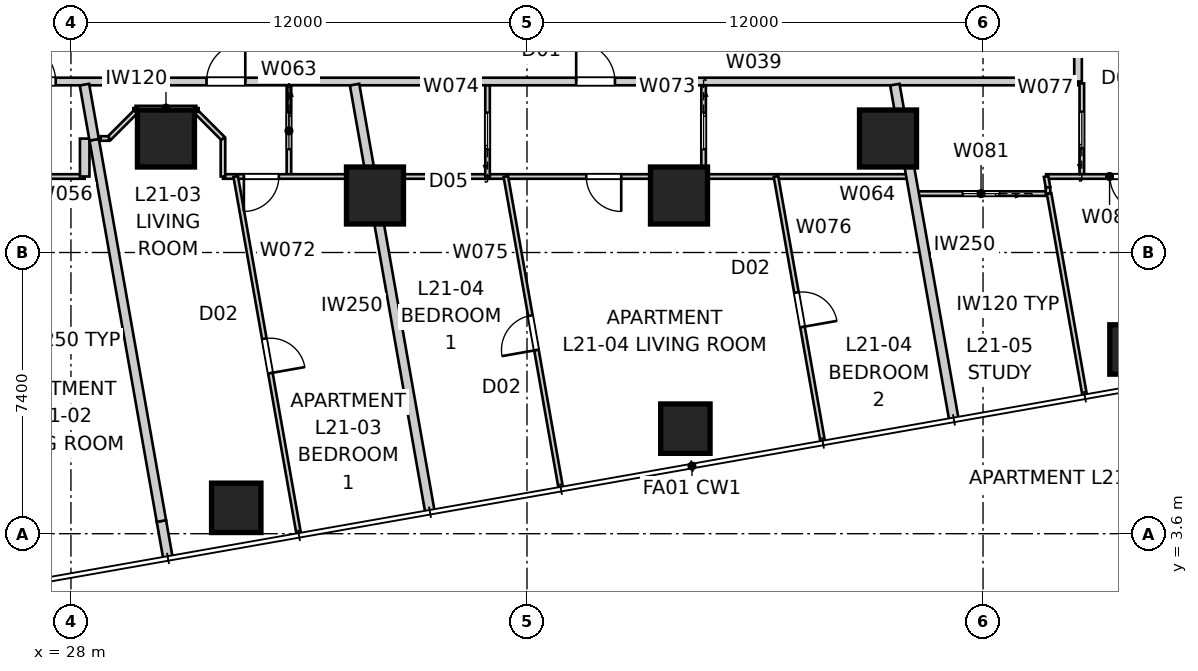
"""IFC4 building model, lengths in metres.
Left out: names, types, materials, properties, quantities, classifications, styles, units other than length and angle.
Written with IfcOpenShell. Run it as: python <this file> out.ifc"""

import sys

from ifc_helpers import new_model, si_unit, direction, frame, frame_2d, origin, origin_2d, place, context, subcontext, project, spatial, rectangle, extrude, element, fill, save


model = new_model("IFC4")
c1 = context("Model", 3, precision=1e-05, world=origin(), true_north=direction((0.0, 1.0)))
c2 = subcontext(c1, "Body", "Model", "MODEL_VIEW")
j1 = project(units=[si_unit("LENGTHUNIT", "METRE"), si_unit("PLANEANGLEUNIT", "RADIAN")], contexts=[c1])
p1 = place(None, origin())
s1 = spatial("IfcSite", under=j1, at=p1, CompositionType="ELEMENT")
p2 = place(p1, origin())
s2 = spatial("IfcBuilding", under=s1, at=p2, CompositionType="ELEMENT")
p3 = place(p2, frame((0.0, 0.0, 79.4)))
s3 = spatial("IfcBuildingStorey", under=s2, at=p3, CompositionType="ELEMENT", Elevation=79.4)
for number, where, z_axis, x_axis in (
    (1, (32.35, 4.281, -0.15), (0.0, 0.0, 1.0), (1.0, 0.0, 0.0)),
    (2, (44.167, 6.365, -0.15), (0.0, 0.0, 1.0), (1.0, 0.0, 0.0)),
    (3, (55.985, 8.448, -0.15), (0.0, 0.0, 1.0), (1.0, 0.0, 0.0)),
):
    element("IfcColumn", number, at=place(p3, frame(where, z_axis=z_axis, x_axis=x_axis)), inside=s3, PredefinedType="COLUMN", context=c2, shape_type="SweptSolid", body=[
        extrude(rectangle(XDim=1.3, YDim=1.3, at=origin_2d()), origin(), (0.0, 0.0, 1.0), 3.55),
    ])
for number, where, z_axis, x_axis in (
    (4, (30.5, 14.0, 0.0), (0.0, 0.0, 1.0), (1.0, 0.0, 0.0)),
    (5, (36.0, 12.5, 0.0), (0.0, 0.0, 1.0), (1.0, 0.0, 0.0)),
    (6, (44.0, 12.5, 0.0), (0.0, 0.0, 1.0), (1.0, 0.0, 0.0)),
    (7, (49.5, 14.0, 0.0), (0.0, 0.0, 1.0), (1.0, 0.0, 0.0)),
):
    element("IfcColumn", number, at=place(p3, frame(where, z_axis=z_axis, x_axis=x_axis)), inside=s3, PredefinedType="COLUMN", context=c2, shape_type="SweptSolid", body=[
        extrude(rectangle(XDim=1.5, YDim=1.5, at=origin_2d()), origin(), (0.0, 0.0, 1.0), 3.4),
    ])
p4 = place(p3, frame((25.5, 15.5, 0.0), z_axis=(0.0, 0.0, 1.0), x_axis=(1.0, 0.0, 0.0)))
e8 = element("IfcWall", 8, at=p4, inside=s3, PredefinedType="PARTITIONING", context=c2, shape_type="SweptSolid", body=[
    extrude(rectangle(XDim=29.0, YDim=0.2, at=frame_2d((14.5, 0.0))), origin(), (0.0, 0.0, 1.0), 3.25),
])
p5 = place(p4, frame((15.794, 0.0, 0.0)))
e9 = element("IfcOpeningElement", 9, at=p5, cuts=e8, PredefinedType="OPENING", context=c2, shape_type="SweptSolid", body=[
    extrude(rectangle(XDim=1.02, YDim=2.34, at=frame_2d((0.51, 1.17))), frame((0.0, 0.11, 0.0), z_axis=(0.0, -1.0, 0.0), x_axis=(1.0, 0.0, 0.0)), (0.0, 0.0, 1.0), 0.22),
])
p6 = place(p4, frame((6.067, 0.0, 0.0)))
e10 = element("IfcOpeningElement", 10, at=p6, cuts=e8, PredefinedType="OPENING", context=c2, shape_type="SweptSolid", body=[
    extrude(rectangle(XDim=1.02, YDim=2.34, at=frame_2d((0.51, 1.17))), frame((0.0, 0.11, 0.0), z_axis=(0.0, -1.0, 0.0), x_axis=(1.0, 0.0, 0.0)), (0.0, 0.0, 1.0), 0.22),
])
p7 = place(p4, frame((1.079, 0.0, 0.0)))
e11 = element("IfcOpeningElement", 11, at=p7, cuts=e8, PredefinedType="OPENING", context=c2, shape_type="SweptSolid", body=[
    extrude(rectangle(XDim=1.02, YDim=2.34, at=frame_2d((0.51, 1.17))), frame((0.0, 0.11, 0.0), z_axis=(0.0, -1.0, 0.0), x_axis=(1.0, 0.0, 0.0)), (0.0, 0.0, 1.0), 0.22),
])
p8 = place(p3, frame((54.5, 15.5, 0.0), z_axis=(0.0, 0.0, 1.0), x_axis=(0.0, 1.0, 0.0)))
e12 = element("IfcWall", 12, at=p8, inside=s3, PredefinedType="PARTITIONING", context=c2, shape_type="SweptSolid", body=[
    extrude(rectangle(XDim=29.0, YDim=0.2, at=frame_2d((14.5, 0.0))), origin(), (0.0, 0.0, 1.0), 3.25),
])
p9 = place(p8, frame((21.815, 0.0, 0.0)))
e13 = element("IfcOpeningElement", 13, at=p9, cuts=e12, PredefinedType="OPENING", context=c2, shape_type="SweptSolid", body=[
    extrude(rectangle(XDim=1.02, YDim=2.34, at=frame_2d((0.51, 1.17))), frame((0.0, 0.11, 0.0), z_axis=(0.0, -1.0, 0.0), x_axis=(1.0, 0.0, 0.0)), (0.0, 0.0, 1.0), 0.22),
])
p10 = place(p8, frame((2.855, 0.0, 0.0)))
e14 = element("IfcOpeningElement", 14, at=p10, cuts=e12, PredefinedType="OPENING", context=c2, shape_type="SweptSolid", body=[
    extrude(rectangle(XDim=1.02, YDim=2.1, at=frame_2d((0.51, 1.05))), frame((0.0, 0.11, 0.0), z_axis=(0.0, -1.0, 0.0), x_axis=(1.0, 0.0, 0.0)), (0.0, 0.0, 1.0), 0.22),
])
p11 = place(p3, frame((37.448, 4.164, 0.0), z_axis=(0.0, 0.0, 1.0), x_axis=(-0.173635416642, 0.98481000304, 0.0)))
e15 = element("IfcWall", 15, at=p11, inside=s3, PredefinedType="PARTITIONING", context=c2, shape_type="SweptSolid", body=[
    extrude(rectangle(XDim=11.427, YDim=0.25, at=frame_2d((5.713, 0.0))), origin(), (0.0, 0.0, 1.0), 3.25),
])
p12 = place(p3, frame((51.235, 6.595, 0.0), z_axis=(0.0, 0.0, 1.0), x_axis=(-0.173654738504, 0.984806596137, 0.0)))
e16 = element("IfcWall", 16, at=p12, inside=s3, PredefinedType="PARTITIONING", context=c2, shape_type="SweptSolid", body=[
    extrude(rectangle(XDim=8.958, YDim=0.25, at=frame_2d((4.479, 0.0))), origin(), (0.0, 0.0, 1.0), 3.25),
])
p13 = place(p3, frame((30.554, 2.949, 0.0), z_axis=(0.0, 0.0, 1.0), x_axis=(-0.173813186416, 0.984778643263, 0.0)))
e17 = element("IfcWall", 17, at=p13, inside=s3, PredefinedType="PARTITIONING", context=c2, shape_type="SweptSolid", body=[
    extrude(rectangle(XDim=1.0, YDim=0.25, at=frame_2d((0.5, 0.0))), origin(), (0.0, 0.0, 1.0), 3.25),
])
p14 = place(p3, frame((30.38, 3.934, 0.0), z_axis=(0.0, 0.0, 1.0), x_axis=(-0.173644522411, 0.984808397525, 0.0)))
e18 = element("IfcWall", 18, at=p14, inside=s3, PredefinedType="PARTITIONING", context=c2, shape_type="SweptSolid", body=[
    extrude(rectangle(XDim=10.188, YDim=0.25, at=frame_2d((5.094, 0.0))), origin(), (0.0, 0.0, 1.0), 2.638),
])
p15 = place(p3, frame((28.611, 13.967, 0.0), z_axis=(0.0, 0.0, 1.0), x_axis=(-0.173634105885, 0.984810234143, 0.0)))
e19 = element("IfcWall", 19, at=p15, inside=s3, PredefinedType="PARTITIONING", context=c2, shape_type="SweptSolid", body=[
    extrude(rectangle(XDim=1.474, YDim=0.25, at=frame_2d((0.737, 0.0))), origin(), (0.0, 0.0, 1.0), 3.25),
])
p16 = place(p3, frame((28.362, 13.0, 0.0), z_axis=(0.0, 0.0, 1.0), x_axis=(-1.0, 0.0, 0.0)))
e20 = element("IfcWall", 20, at=p16, inside=s3, PredefinedType="PARTITIONING", context=c2, shape_type="SweptSolid", body=[
    extrude(rectangle(XDim=4.151, YDim=0.12, at=frame_2d((2.076, 0.0))), origin(), (0.0, 0.0, 1.0), 2.638),
])
p17 = place(p16, frame((1.76, 0.0, 0.0)))
e21 = element("IfcOpeningElement", 21, at=p17, cuts=e20, PredefinedType="OPENING", context=c2, shape_type="SweptSolid", body=[
    extrude(rectangle(XDim=0.92, YDim=2.34, at=frame_2d((0.46, 1.17))), frame((0.0, 0.07, 0.0), z_axis=(0.0, -1.0, 0.0), x_axis=(1.0, 0.0, 0.0)), (0.0, 0.0, 1.0), 0.14),
])
p18 = place(p3, frame((28.362, 13.998, 0.0), z_axis=(0.0, 0.0, 1.0), x_axis=(0.0, -1.0, 0.0)))
e22 = element("IfcWall", 22, at=p18, inside=s3, PredefinedType="PARTITIONING", context=c2, shape_type="SweptSolid", body=[
    extrude(rectangle(XDim=0.998, YDim=0.25, at=frame_2d((0.499, 0.0))), origin(), (0.0, 0.0, 1.0), 3.25),
])
p19 = place(p3, frame((33.736, 15.4, 0.0), z_axis=(0.0, 0.0, 1.0), x_axis=(0.0, -1.0, 0.0)))
e23 = element("IfcWall", 23, at=p19, inside=s3, PredefinedType="PARTITIONING", context=c2, shape_type="SweptSolid", body=[
    extrude(rectangle(XDim=2.4, YDim=0.12, at=frame_2d((1.2, 0.0))), origin(), (0.0, 0.0, 1.0), 3.25),
])
p20 = place(p19, frame((0.72, 0.0, 0.0)))
e24 = element("IfcOpeningElement", 24, at=p20, cuts=e23, PredefinedType="OPENING", context=c2, shape_type="SweptSolid", body=[
    extrude(rectangle(XDim=0.96, YDim=2.1, at=frame_2d((0.48, 1.05))), frame((0.0, 0.07, 0.0), z_axis=(0.0, -1.0, 0.0), x_axis=(1.0, 0.0, 0.0)), (0.0, 0.0, 1.0), 0.14),
])
p21 = place(p3, frame((50.105, 13.0, 0.0), z_axis=(0.0, 0.0, 1.0), x_axis=(-1.0, 0.0, 0.0)))
e25 = element("IfcWall", 25, at=p21, inside=s3, PredefinedType="PARTITIONING", context=c2, shape_type="SweptSolid", body=[
    extrude(rectangle(XDim=18.105, YDim=0.12, at=frame_2d((9.053, 0.0))), origin(), (0.0, 0.0, 1.0), 2.55),
])
p22 = place(p21, frame((7.626, 0.0, 0.0)))
e26 = element("IfcOpeningElement", 26, at=p22, cuts=e25, PredefinedType="OPENING", context=c2, shape_type="SweptSolid", body=[
    extrude(rectangle(XDim=0.92, YDim=2.34, at=frame_2d((0.46, 1.17))), frame((0.0, 0.07, 0.0), z_axis=(0.0, -1.0, 0.0), x_axis=(1.0, 0.0, 0.0)), (0.0, 0.0, 1.0), 0.14),
])
p23 = place(p21, frame((16.635, 0.0, 0.0)))
e27 = element("IfcOpeningElement", 27, at=p23, cuts=e25, PredefinedType="OPENING", context=c2, shape_type="SweptSolid", body=[
    extrude(rectangle(XDim=0.92, YDim=2.34, at=frame_2d((0.46, 1.17))), frame((0.0, 0.07, 0.0), z_axis=(0.0, -1.0, 0.0), x_axis=(1.0, 0.0, 0.0)), (0.0, 0.0, 1.0), 0.14),
])
p24 = place(p3, frame((32.0, 13.0, 0.0), z_axis=(0.0, 0.0, 1.0), x_axis=(0.0, 1.0, 0.0)))
e28 = element("IfcWall", 28, at=p24, inside=s3, PredefinedType="PARTITIONING", context=c2, shape_type="SweptSolid", body=[
    extrude(rectangle(XDim=1.0, YDim=0.12, at=frame_2d((0.5, 0.0))), origin(), (0.0, 0.0, 1.0), 3.25),
])
p25 = place(p3, frame((32.0, 14.0, 0.0), z_axis=(0.0, 0.0, 1.0), x_axis=(-0.707106781187, 0.707106781187, 0.0)))
e29 = element("IfcWall", 29, at=p25, inside=s3, PredefinedType="PARTITIONING", context=c2, shape_type="SweptSolid", body=[
    extrude(rectangle(XDim=0.99, YDim=0.12, at=frame_2d((0.495, 0.0))), origin(), (0.0, 0.0, 1.0), 3.25),
])
p26 = place(p3, frame((31.3, 14.8, 0.0), z_axis=(0.0, 0.0, 1.0), x_axis=(-1.0, 0.0, 0.0)))
e30 = element("IfcWall", 30, at=p26, inside=s3, PredefinedType="PARTITIONING", context=c2, shape_type="SweptSolid", body=[
    extrude(rectangle(XDim=1.6, YDim=0.12, at=frame_2d((0.8, 0.0))), origin(), (0.0, 0.0, 1.0), 3.25),
])
p27 = place(p3, frame((29.7, 14.7, 0.0), z_axis=(0.0, 0.0, 1.0), x_axis=(-0.707106781187, -0.707106781187, 0.0)))
e31 = element("IfcWall", 31, at=p27, inside=s3, PredefinedType="PARTITIONING", context=c2, shape_type="SweptSolid", body=[
    extrude(rectangle(XDim=0.99, YDim=0.12, at=frame_2d((0.495, 0.0))), origin(), (0.0, 0.0, 1.0), 3.25),
])
p28 = place(p3, frame((29.0, 14.0, 0.0), z_axis=(0.0, 0.0, 1.0), x_axis=(-1.0, 0.0, 0.0)))
e32 = element("IfcWall", 32, at=p28, inside=s3, PredefinedType="PARTITIONING", context=c2, shape_type="SweptSolid", body=[
    extrude(rectangle(XDim=0.219, YDim=0.12, at=frame_2d((0.109, 0.0))), origin(), (0.0, 0.0, 1.0), 3.25),
])
p29 = place(p3, frame((32.336, 13.0, 0.0), z_axis=(0.0, 0.0, 1.0), x_axis=(0.173624894944, -0.984811858101, 0.0)))
e33 = element("IfcWall", 33, at=p29, inside=s3, PredefinedType="PARTITIONING", context=c2, shape_type="SweptSolid", body=[
    extrude(rectangle(XDim=9.549, YDim=0.12, at=frame_2d((4.774, 0.0))), origin(), (0.0, 0.0, 1.0), 3.25),
])
p30 = place(p29, frame((4.334, 0.0, 0.0)))
e34 = element("IfcOpeningElement", 34, at=p30, cuts=e33, PredefinedType="OPENING", context=c2, shape_type="SweptSolid", body=[
    extrude(rectangle(XDim=0.92, YDim=2.34, at=frame_2d((0.46, 1.17))), frame((0.0, 0.07, 0.0), z_axis=(0.0, -1.0, 0.0), x_axis=(1.0, 0.0, 0.0)), (0.0, 0.0, 1.0), 0.14),
])
p31 = place(p3, frame((44.647, 15.4, 0.0), z_axis=(0.0, 0.0, 1.0), x_axis=(0.0, -1.0, 0.0)))
e35 = element("IfcWall", 35, at=p31, inside=s3, PredefinedType="PARTITIONING", context=c2, shape_type="SweptSolid", body=[
    extrude(rectangle(XDim=2.4, YDim=0.12, at=frame_2d((1.2, 0.0))), origin(), (0.0, 0.0, 1.0), 3.25),
])
p32 = place(p31, frame((0.72, 0.0, 0.0)))
e36 = element("IfcOpeningElement", 36, at=p32, cuts=e35, PredefinedType="OPENING", context=c2, shape_type="SweptSolid", body=[
    extrude(rectangle(XDim=0.96, YDim=2.1, at=frame_2d((0.48, 1.05))), frame((0.0, 0.07, 0.0), z_axis=(0.0, -1.0, 0.0), x_axis=(1.0, 0.0, 0.0)), (0.0, 0.0, 1.0), 0.14),
])
p33 = place(p3, frame((38.962, 13.0, 0.0), z_axis=(0.0, 0.0, 1.0), x_axis=(0.0, 1.0, 0.0)))
e37 = element("IfcWall", 37, at=p33, inside=s3, PredefinedType="PARTITIONING", context=c2, shape_type="SweptSolid", body=[
    extrude(rectangle(XDim=2.4, YDim=0.12, at=frame_2d((1.2, 0.0))), origin(), (0.0, 0.0, 1.0), 3.25),
])
p34 = place(p33, frame((0.72, 0.0, 0.0)))
e38 = element("IfcOpeningElement", 38, at=p34, cuts=e37, PredefinedType="OPENING", context=c2, shape_type="SweptSolid", body=[
    extrude(rectangle(XDim=0.96, YDim=2.1, at=frame_2d((0.48, 1.05))), frame((0.0, 0.07, 0.0), z_axis=(0.0, -1.0, 0.0), x_axis=(1.0, 0.0, 0.0)), (0.0, 0.0, 1.0), 0.14),
])
p35 = place(p3, frame((40.887, 4.812, 0.0), z_axis=(0.0, 0.0, 1.0), x_axis=(-0.173647980238, 0.984807787824, 0.0)))
e39 = element("IfcWall", 39, at=p35, inside=s3, PredefinedType="PARTITIONING", context=c2, shape_type="SweptSolid", body=[
    extrude(rectangle(XDim=8.315, YDim=0.12, at=frame_2d((4.157, 0.0))), origin(), (0.0, 0.0, 1.0), 3.25),
])
p36 = place(p35, frame((3.677, 0.0, 0.0)))
e40 = element("IfcOpeningElement", 40, at=p36, cuts=e39, PredefinedType="OPENING", context=c2, shape_type="SweptSolid", body=[
    extrude(rectangle(XDim=0.92, YDim=2.34, at=frame_2d((0.46, 1.17))), frame((0.0, 0.07, 0.0), z_axis=(0.0, -1.0, 0.0), x_axis=(1.0, 0.0, 0.0)), (0.0, 0.0, 1.0), 0.14),
])
p37 = place(p3, frame((46.552, 13.0, 0.0), z_axis=(0.0, 0.0, 1.0), x_axis=(0.173639776761, -0.984809234282, 0.0)))
e41 = element("IfcWall", 41, at=p37, inside=s3, PredefinedType="PARTITIONING", context=c2, shape_type="SweptSolid", body=[
    extrude(rectangle(XDim=7.081, YDim=0.12, at=frame_2d((3.541, 0.0))), origin(), (0.0, 0.0, 1.0), 3.25),
])
p38 = place(p37, frame((3.1, 0.0, 0.0)))
e42 = element("IfcOpeningElement", 42, at=p38, cuts=e41, PredefinedType="OPENING", context=c2, shape_type="SweptSolid", body=[
    extrude(rectangle(XDim=0.92, YDim=2.34, at=frame_2d((0.46, 1.17))), frame((0.0, 0.07, 0.0), z_axis=(0.0, -1.0, 0.0), x_axis=(1.0, 0.0, 0.0)), (0.0, 0.0, 1.0), 0.14),
])
p39 = place(p3, frame((54.6, 13.0, 0.0), z_axis=(0.0, 0.0, 1.0), x_axis=(0.0, 1.0, 0.0)))
e43 = element("IfcWall", 43, at=p39, inside=s3, PredefinedType="PARTITIONING", context=c2, shape_type="SweptSolid", body=[
    extrude(rectangle(XDim=2.45, YDim=0.12, at=frame_2d((1.225, 0.0))), origin(), (0.0, 0.0, 1.0), 3.25),
])
p40 = place(p39, frame((0.745, 0.0, 0.0)))
e44 = element("IfcOpeningElement", 44, at=p40, cuts=e43, PredefinedType="OPENING", context=c2, shape_type="SweptSolid", body=[
    extrude(rectangle(XDim=0.96, YDim=2.1, at=frame_2d((0.48, 1.05))), frame((0.0, 0.07, 0.0), z_axis=(0.0, -1.0, 0.0), x_axis=(1.0, 0.0, 0.0)), (0.0, 0.0, 1.0), 0.14),
])
p41 = place(p3, frame((57.0, 13.0, 0.0), z_axis=(0.0, 0.0, 1.0), x_axis=(-1.0, 0.0, 0.0)))
e45 = element("IfcWall", 45, at=p41, inside=s3, PredefinedType="PARTITIONING", context=c2, shape_type="SweptSolid", body=[
    extrude(rectangle(XDim=3.34, YDim=0.12, at=frame_2d((1.67, 0.0))), origin(), (0.0, 0.0, 1.0), 3.25),
])
p42 = place(p41, frame((0.74, 0.0, 0.0)))
e46 = element("IfcOpeningElement", 46, at=p42, cuts=e45, PredefinedType="OPENING", context=c2, shape_type="SweptSolid", body=[
    extrude(rectangle(XDim=0.92, YDim=2.34, at=frame_2d((0.46, 1.17))), frame((0.0, 0.07, 0.0), z_axis=(0.0, -1.0, 0.0), x_axis=(1.0, 0.0, 0.0)), (0.0, 0.0, 1.0), 0.14),
])
p43 = place(p3, frame((53.71, 12.55, 0.0), z_axis=(0.0, 0.0, 1.0), x_axis=(-1.0, 0.0, 0.0)))
e47 = element("IfcWall", 47, at=p43, inside=s3, PredefinedType="PARTITIONING", context=c2, shape_type="SweptSolid", body=[
    extrude(rectangle(XDim=3.525, YDim=0.12, at=frame_2d((1.763, 0.0))), origin(), (0.0, 0.0, 1.0), 3.25),
])
p44 = place(p43, frame((1.283, 0.0, 0.0)))
e48 = element("IfcOpeningElement", 48, at=p44, cuts=e47, PredefinedType="OPENING", context=c2, shape_type="SweptSolid", body=[
    extrude(rectangle(XDim=0.96, YDim=2.1, at=frame_2d((0.48, 1.05))), frame((0.0, 0.07, 0.0), z_axis=(0.0, -1.0, 0.0), x_axis=(1.0, 0.0, 0.0)), (0.0, 0.0, 1.0), 0.14),
])
p45 = place(p3, frame((53.66, 13.0, 0.0), z_axis=(0.0, 0.0, 1.0), x_axis=(0.172927442902, -0.984934566096, 0.0)))
e49 = element("IfcWall", 49, at=p45, inside=s3, PredefinedType="PARTITIONING", context=c2, shape_type="SweptSolid", body=[
    extrude(rectangle(XDim=0.292, YDim=0.12, at=frame_2d((0.146, 0.0))), origin(), (0.0, 0.0, 1.0), 3.25),
])
p46 = place(p3, frame((53.739, 12.55, 0.0), z_axis=(0.0, 0.0, 1.0), x_axis=(0.173632864151, -0.984810453076, 0.0)))
e50 = element("IfcWall", 50, at=p46, inside=s3, PredefinedType="PARTITIONING", context=c2, shape_type="SweptSolid", body=[
    extrude(rectangle(XDim=5.389, YDim=0.12, at=frame_2d((2.695, 0.0))), origin(), (0.0, 0.0, 1.0), 3.25),
])
for number, where, z_axis, x_axis in (
    (51, (31.3, 14.8, 0.0), (0.0, 0.0, 1.0), (0.0, -1.0, 0.0)),
    (52, (29.7, 14.8, 0.0), (0.0, 0.0, 1.0), (0.0, -1.0, 0.0)),
):
    element("IfcWall", number, at=place(p3, frame(where, z_axis=z_axis, x_axis=x_axis)), inside=s3, PredefinedType="PARTITIONING", context=c2, shape_type="SweptSolid", body=[
        extrude(rectangle(XDim=0.1, YDim=0.12, at=frame_2d((0.05, 0.0))), origin(), (0.0, 0.0, 1.0), 3.25),
    ])
p47 = place(p3, frame((53.71, 12.712, 0.0), z_axis=(0.0, 0.0, 1.0), x_axis=(0.0, -1.0, 0.0)))
e53 = element("IfcWall", 53, at=p47, inside=s3, PredefinedType="PARTITIONING", context=c2, shape_type="SweptSolid", body=[
    extrude(rectangle(XDim=0.162, YDim=0.12, at=frame_2d((0.081, 0.0))), origin(), (0.0, 0.0, 1.0), 3.25),
])
p48 = place(p5, origin())
e54 = element("IfcDoor", 54, at=p48, inside=s3, OperationType="SINGLE_SWING_LEFT", PredefinedType="DOOR", context=c2, shape_type="SweptSolid", body=[
    extrude(rectangle(XDim=1.02, YDim=2.34, at=frame_2d((0.51, 1.17))), frame((0.0, 0.025, 0.0), z_axis=(0.0, -1.0, 0.0), x_axis=(1.0, 0.0, 0.0)), (0.0, 0.0, 1.0), 0.05),
])
fill(e9, e54)
p49 = place(p6, origin())
e55 = element("IfcDoor", 55, at=p49, inside=s3, OperationType="SINGLE_SWING_RIGHT", PredefinedType="DOOR", context=c2, shape_type="SweptSolid", body=[
    extrude(rectangle(XDim=1.02, YDim=2.34, at=frame_2d((0.51, 1.17))), frame((0.0, 0.025, 0.0), z_axis=(0.0, -1.0, 0.0), x_axis=(1.0, 0.0, 0.0)), (0.0, 0.0, 1.0), 0.05),
])
fill(e10, e55)
p50 = place(p7, origin())
e56 = element("IfcDoor", 56, at=p50, inside=s3, OperationType="SINGLE_SWING_LEFT", PredefinedType="DOOR", context=c2, shape_type="SweptSolid", body=[
    extrude(rectangle(XDim=1.02, YDim=2.34, at=frame_2d((0.51, 1.17))), frame((0.0, 0.025, 0.0), z_axis=(0.0, -1.0, 0.0), x_axis=(1.0, 0.0, 0.0)), (0.0, 0.0, 1.0), 0.05),
])
fill(e11, e56)
p51 = place(p40, origin())
e57 = element("IfcDoor", 57, at=p51, inside=s3, OperationType="SLIDING_TO_LEFT", PredefinedType="DOOR", context=c2, shape_type="SweptSolid", body=[
    extrude(rectangle(XDim=0.96, YDim=2.1, at=frame_2d((0.48, 1.05))), frame((0.0, 0.025, 0.0), z_axis=(0.0, -1.0, 0.0), x_axis=(1.0, 0.0, 0.0)), (0.0, 0.0, 1.0), 0.05),
])
fill(e44, e57)
p52 = place(p42, origin())
e58 = element("IfcDoor", 58, at=p52, inside=s3, OperationType="SINGLE_SWING_LEFT", PredefinedType="DOOR", context=c2, shape_type="SweptSolid", body=[
    extrude(rectangle(XDim=0.92, YDim=2.34, at=frame_2d((0.46, 1.17))), frame((0.0, 0.025, 0.0), z_axis=(0.0, -1.0, 0.0), x_axis=(1.0, 0.0, 0.0)), (0.0, 0.0, 1.0), 0.05),
])
fill(e46, e58)
p53 = place(p22, origin())
e59 = element("IfcDoor", 59, at=p53, inside=s3, OperationType="SINGLE_SWING_LEFT", PredefinedType="DOOR", context=c2, shape_type="SweptSolid", body=[
    extrude(rectangle(XDim=0.92, YDim=2.34, at=frame_2d((0.46, 1.17))), frame((0.0, 0.025, 0.0), z_axis=(0.0, -1.0, 0.0), x_axis=(1.0, 0.0, 0.0)), (0.0, 0.0, 1.0), 0.05),
])
fill(e26, e59)
p54 = place(p32, origin())
e60 = element("IfcDoor", 60, at=p54, inside=s3, OperationType="SLIDING_TO_LEFT", PredefinedType="DOOR", context=c2, shape_type="SweptSolid", body=[
    extrude(rectangle(XDim=0.96, YDim=2.1, at=frame_2d((0.48, 1.05))), frame((0.0, 0.025, 0.0), z_axis=(0.0, -1.0, 0.0), x_axis=(1.0, 0.0, 0.0)), (0.0, 0.0, 1.0), 0.05),
])
fill(e36, e60)
p55 = place(p34, origin())
e61 = element("IfcDoor", 61, at=p55, inside=s3, OperationType="SLIDING_TO_LEFT", PredefinedType="DOOR", context=c2, shape_type="SweptSolid", body=[
    extrude(rectangle(XDim=0.96, YDim=2.1, at=frame_2d((0.48, 1.05))), frame((0.0, 0.025, 0.0), z_axis=(0.0, -1.0, 0.0), x_axis=(1.0, 0.0, 0.0)), (0.0, 0.0, 1.0), 0.05),
])
fill(e38, e61)
p56 = place(p20, origin())
e62 = element("IfcDoor", 62, at=p56, inside=s3, OperationType="SLIDING_TO_LEFT", PredefinedType="DOOR", context=c2, shape_type="SweptSolid", body=[
    extrude(rectangle(XDim=0.96, YDim=2.1, at=frame_2d((0.48, 1.05))), frame((0.0, 0.025, 0.0), z_axis=(0.0, -1.0, 0.0), x_axis=(1.0, 0.0, 0.0)), (0.0, 0.0, 1.0), 0.05),
])
fill(e24, e62)
p57 = place(p23, origin())
e63 = element("IfcDoor", 63, at=p57, inside=s3, OperationType="SINGLE_SWING_RIGHT", PredefinedType="DOOR", context=c2, shape_type="SweptSolid", body=[
    extrude(rectangle(XDim=0.92, YDim=2.34, at=frame_2d((0.46, 1.17))), frame((0.0, 0.025, 0.0), z_axis=(0.0, -1.0, 0.0), x_axis=(1.0, 0.0, 0.0)), (0.0, 0.0, 1.0), 0.05),
])
fill(e27, e63)
p58 = place(p44, origin())
e64 = element("IfcDoor", 64, at=p58, inside=s3, OperationType="SLIDING_TO_LEFT", PredefinedType="DOOR", context=c2, shape_type="SweptSolid", body=[
    extrude(rectangle(XDim=0.96, YDim=2.1, at=frame_2d((0.48, 1.05))), frame((0.0, 0.025, 0.0), z_axis=(0.0, -1.0, 0.0), x_axis=(1.0, 0.0, 0.0)), (0.0, 0.0, 1.0), 0.05),
])
fill(e48, e64)
p59 = place(p36, origin())
e65 = element("IfcDoor", 65, at=p59, inside=s3, OperationType="SINGLE_SWING_LEFT", PredefinedType="DOOR", context=c2, shape_type="SweptSolid", body=[
    extrude(rectangle(XDim=0.92, YDim=2.34, at=frame_2d((0.46, 1.17))), frame((0.0, 0.025, 0.0), z_axis=(0.0, -1.0, 0.0), x_axis=(1.0, 0.0, 0.0)), (0.0, 0.0, 1.0), 0.05),
])
fill(e40, e65)
p60 = place(p38, origin())
e66 = element("IfcDoor", 66, at=p60, inside=s3, OperationType="SINGLE_SWING_RIGHT", PredefinedType="DOOR", context=c2, shape_type="SweptSolid", body=[
    extrude(rectangle(XDim=0.92, YDim=2.34, at=frame_2d((0.46, 1.17))), frame((0.0, 0.025, 0.0), z_axis=(0.0, -1.0, 0.0), x_axis=(1.0, 0.0, 0.0)), (0.0, 0.0, 1.0), 0.05),
])
fill(e42, e66)
p61 = place(p30, origin())
e67 = element("IfcDoor", 67, at=p61, inside=s3, OperationType="SINGLE_SWING_RIGHT", PredefinedType="DOOR", context=c2, shape_type="SweptSolid", body=[
    extrude(rectangle(XDim=0.92, YDim=2.34, at=frame_2d((0.46, 1.17))), frame((0.0, 0.025, 0.0), z_axis=(0.0, -1.0, 0.0), x_axis=(1.0, 0.0, 0.0)), (0.0, 0.0, 1.0), 0.05),
])
fill(e34, e67)
save(model, sys.argv[1])
